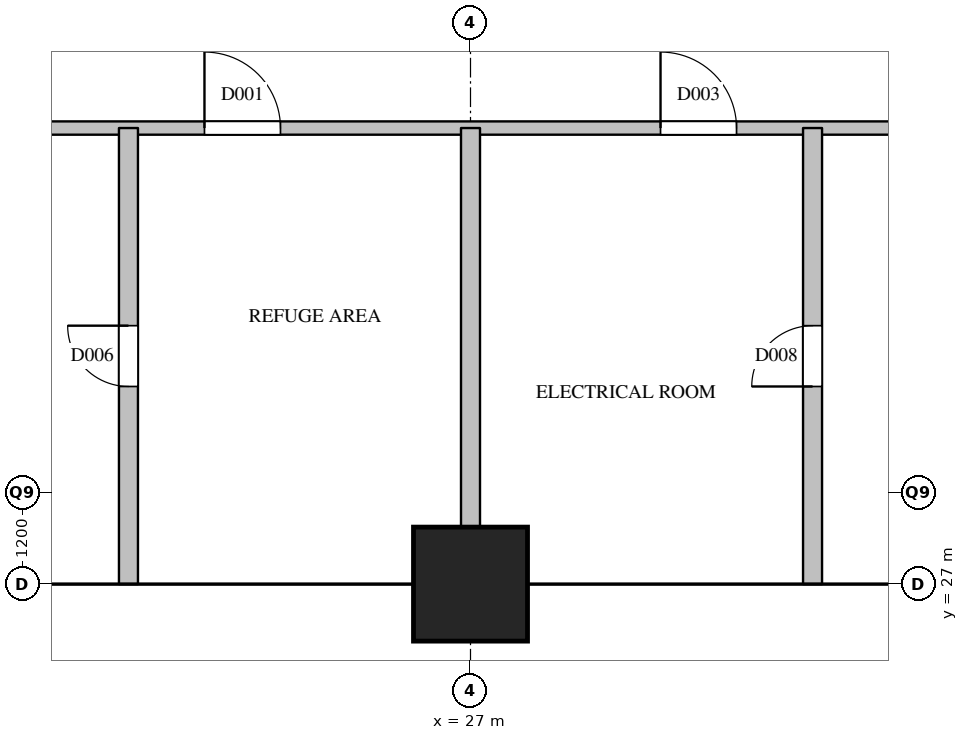
"""IFC4 building model, lengths in metres.
Left out: names, types, materials, properties, quantities, classifications, styles, units other than length and angle.
Written with IfcOpenShell. Run it as: python <this file> out.ifc"""

import sys

from ifc_helpers import new_model, si_unit, direction, frame, frame_2d, origin, origin_2d, place, context, subcontext, project, spatial, rectangle, extrude, element, fill, save


model = new_model("IFC4")
c1 = context("Model", 3, precision=1e-05, world=origin(), true_north=direction((0.0, 1.0)))
c2 = subcontext(c1, "Body", "Model", "MODEL_VIEW")
j1 = project(units=[si_unit("LENGTHUNIT", "METRE"), si_unit("PLANEANGLEUNIT", "RADIAN")], contexts=[c1])
p1 = place(None, origin())
s1 = spatial("IfcSite", under=j1, at=p1, CompositionType="ELEMENT")
p2 = place(p1, origin())
s2 = spatial("IfcBuilding", under=s1, at=p2, CompositionType="ELEMENT")
p3 = place(p2, frame((0.0, 0.0, 197.3)))
s3 = spatial("IfcBuildingStorey", under=s2, at=p3, CompositionType="ELEMENT", Elevation=197.3)
p4 = place(p3, frame((27.0, 27.0, 0.0), z_axis=(0.0, 0.0, 1.0), x_axis=(1.0, 0.0, 0.0)))
e1 = element("IfcColumn", 1, at=p4, inside=s3, PredefinedType="COLUMN", context=c2, shape_type="SweptSolid", body=[
    extrude(rectangle(XDim=1.5, YDim=1.5, at=origin_2d()), origin(), (0.0, 0.0, 1.0), 6.0),
])
p5 = place(p3, frame((18.0, 33.0, 0.0), z_axis=(0.0, 0.0, 1.0), x_axis=(1.0, 0.0, 0.0)))
e2 = element("IfcWall", 2, at=p5, inside=s3, PredefinedType="PARTITIONING", context=c2, shape_type="SweptSolid", body=[
    extrude(rectangle(XDim=18.0, YDim=0.175, at=frame_2d((9.0, 0.0))), origin(), (0.0, 0.0, 1.0), 5.7),
])
p6 = place(p5, frame((5.5, 0.0, 0.0)))
e3 = element("IfcOpeningElement", 3, at=p6, cuts=e2, PredefinedType="OPENING", context=c2, shape_type="SweptSolid", body=[
    extrude(rectangle(XDim=1.0, YDim=2.1, at=frame_2d((0.5, 1.05))), frame((0.0, 0.097, 0.0), z_axis=(0.0, -1.0, 0.0), x_axis=(1.0, 0.0, 0.0)), (0.0, 0.0, 1.0), 0.195),
])
p7 = place(p5, frame((11.5, 0.0, 0.0)))
e4 = element("IfcOpeningElement", 4, at=p7, cuts=e2, PredefinedType="OPENING", context=c2, shape_type="SweptSolid", body=[
    extrude(rectangle(XDim=1.0, YDim=2.1, at=frame_2d((0.5, 1.05))), frame((0.0, 0.097, 0.0), z_axis=(0.0, -1.0, 0.0), x_axis=(1.0, 0.0, 0.0)), (0.0, 0.0, 1.0), 0.195),
])
p8 = place(p3, frame((22.5, 27.0, 0.0), z_axis=(0.0, 0.0, 1.0), x_axis=(0.0, 1.0, 0.0)))
e5 = element("IfcWall", 5, at=p8, inside=s3, PredefinedType="PARTITIONING", context=c2, shape_type="SweptSolid", body=[
    extrude(rectangle(XDim=6.0, YDim=0.25, at=frame_2d((3.0, 0.0))), origin(), (0.0, 0.0, 1.0), 5.7),
])
p9 = place(p8, frame((2.6, 0.0, 0.0)))
e6 = element("IfcOpeningElement", 6, at=p9, cuts=e5, PredefinedType="OPENING", context=c2, shape_type="SweptSolid", body=[
    extrude(rectangle(XDim=0.8, YDim=2.1, at=frame_2d((0.4, 1.05))), frame((0.0, 0.135, 0.0), z_axis=(0.0, -1.0, 0.0), x_axis=(1.0, 0.0, 0.0)), (0.0, 0.0, 1.0), 0.27),
])
p10 = place(p3, frame((27.0, 27.0, 0.0), z_axis=(0.0, 0.0, 1.0), x_axis=(0.0, 1.0, 0.0)))
e7 = element("IfcWall", 7, at=p10, inside=s3, PredefinedType="PARTITIONING", context=c2, shape_type="SweptSolid", body=[
    extrude(rectangle(XDim=6.0, YDim=0.25, at=frame_2d((3.0, 0.0))), origin(), (0.0, 0.0, 1.0), 5.7),
])
p11 = place(p3, frame((31.5, 27.0, 0.0), z_axis=(0.0, 0.0, 1.0), x_axis=(0.0, 1.0, 0.0)))
e8 = element("IfcWall", 8, at=p11, inside=s3, PredefinedType="PARTITIONING", context=c2, shape_type="SweptSolid", body=[
    extrude(rectangle(XDim=6.0, YDim=0.25, at=frame_2d((3.0, 0.0))), origin(), (0.0, 0.0, 1.0), 5.7),
])
p12 = place(p11, frame((2.6, 0.0, 0.0)))
e9 = element("IfcOpeningElement", 9, at=p12, cuts=e8, PredefinedType="OPENING", context=c2, shape_type="SweptSolid", body=[
    extrude(rectangle(XDim=0.8, YDim=2.1, at=frame_2d((0.4, 1.05))), frame((0.0, 0.135, 0.0), z_axis=(0.0, -1.0, 0.0), x_axis=(1.0, 0.0, 0.0)), (0.0, 0.0, 1.0), 0.27),
])
p13 = place(p6, origin())
e10 = element("IfcDoor", 10, at=p13, inside=s3, OperationType="SINGLE_SWING_LEFT", PredefinedType="DOOR", context=c2, shape_type="SweptSolid", body=[
    extrude(rectangle(XDim=1.0, YDim=2.1, at=frame_2d((0.5, 1.05))), frame((0.0, 0.025, 0.0), z_axis=(0.0, -1.0, 0.0), x_axis=(1.0, 0.0, 0.0)), (0.0, 0.0, 1.0), 0.05),
])
fill(e3, e10)
p14 = place(p7, origin())
e11 = element("IfcDoor", 11, at=p14, inside=s3, OperationType="SINGLE_SWING_LEFT", PredefinedType="DOOR", context=c2, shape_type="SweptSolid", body=[
    extrude(rectangle(XDim=1.0, YDim=2.1, at=frame_2d((0.5, 1.05))), frame((0.0, 0.025, 0.0), z_axis=(0.0, -1.0, 0.0), x_axis=(1.0, 0.0, 0.0)), (0.0, 0.0, 1.0), 0.05),
])
fill(e4, e11)
p15 = place(p9, origin())
e12 = element("IfcDoor", 12, at=p15, inside=s3, OperationType="SINGLE_SWING_RIGHT", PredefinedType="DOOR", context=c2, shape_type="SweptSolid", body=[
    extrude(rectangle(XDim=0.8, YDim=2.1, at=frame_2d((0.4, 1.05))), frame((0.0, 0.025, 0.0), z_axis=(0.0, -1.0, 0.0), x_axis=(1.0, 0.0, 0.0)), (0.0, 0.0, 1.0), 0.05),
])
fill(e6, e12)
p16 = place(p12, origin())
e13 = element("IfcDoor", 13, at=p16, inside=s3, OperationType="SINGLE_SWING_LEFT", PredefinedType="DOOR", context=c2, shape_type="SweptSolid", body=[
    extrude(rectangle(XDim=0.8, YDim=2.1, at=frame_2d((0.4, 1.05))), frame((0.0, 0.025, 0.0), z_axis=(0.0, -1.0, 0.0), x_axis=(1.0, 0.0, 0.0)), (0.0, 0.0, 1.0), 0.05),
])
fill(e9, e13)
save(model, sys.argv[1])
